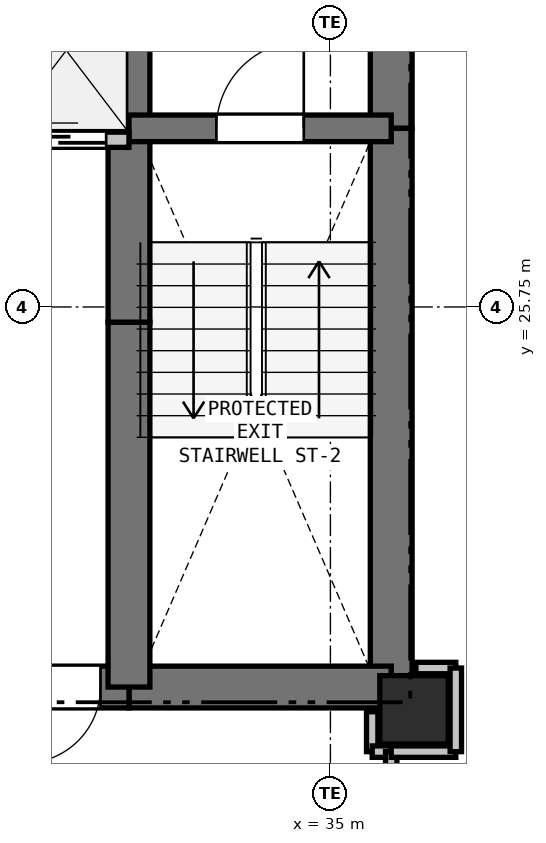
"""IFC4 building model, lengths in metres.
Left out: names, types, materials, properties, quantities, classifications, styles, units other than length and angle.
Written with IfcOpenShell. Run it as: python <this file> out.ifc"""

import sys

from ifc_helpers import new_model, si_unit, direction, frame, frame_2d, origin, origin_2d, place, context, subcontext, project, spatial, rectangle, extrude, element, fill, save


model = new_model("IFC4")
c1 = context("Model", 3, precision=1e-05, world=origin(), true_north=direction((0.0, 1.0)))
c2 = subcontext(c1, "Body", "Model", "MODEL_VIEW")
j1 = project(units=[si_unit("LENGTHUNIT", "METRE"), si_unit("PLANEANGLEUNIT", "RADIAN")], contexts=[c1])
p1 = place(None, origin())
s1 = spatial("IfcSite", under=j1, at=p1, CompositionType="ELEMENT")
p2 = place(p1, origin())
s2 = spatial("IfcBuilding", under=s1, at=p2, CompositionType="ELEMENT")
p3 = place(p2, frame((0.0, 0.0, 29.1)))
s3 = spatial("IfcBuildingStorey", under=s2, at=p3, CompositionType="ELEMENT", Elevation=29.1)
p4 = place(p3, frame((36.1, 20.45, 0.0), z_axis=(0.0, 0.0, 1.0), x_axis=(1.0, 0.0, 0.0)))
e1 = element("IfcColumn", 1, at=p4, inside=s3, PredefinedType="COLUMN", context=c2, shape_type="SweptSolid", body=[
    extrude(rectangle(XDim=0.9, YDim=0.9, at=origin_2d()), origin(), (0.0, 0.0, 1.0), 3.3),
])
p5 = place(p3, frame((35.8, 32.75, 0.0), z_axis=(0.0, 0.0, 1.0), x_axis=(0.0, -1.0, 0.0)))
e2 = element("IfcWall", 2, at=p5, inside=s3, PredefinedType="SHEAR", context=c2, shape_type="SweptSolid", body=[
    extrude(rectangle(XDim=4.65, YDim=0.55, at=frame_2d((2.325, 0.0))), origin(), (0.0, 0.0, 1.0), 3.04),
])
p6 = place(p3, frame((35.8, 28.1, 0.0), z_axis=(0.0, 0.0, 1.0), x_axis=(0.0, -1.0, 0.0)))
e3 = element("IfcWall", 3, at=p6, inside=s3, PredefinedType="SHEAR", context=c2, shape_type="SweptSolid", body=[
    extrude(rectangle(XDim=7.35, YDim=0.55, at=frame_2d((3.675, 0.0))), origin(), (0.0, 0.0, 1.0), 3.04),
])
p7 = place(p3, frame((35.8, 20.75, 0.0), z_axis=(0.0, 0.0, 1.0), x_axis=(-1.0, 0.0, 0.0)))
e4 = element("IfcWall", 4, at=p7, inside=s3, PredefinedType="SHEAR", context=c2, shape_type="SweptSolid", body=[
    extrude(rectangle(XDim=3.45, YDim=0.55, at=frame_2d((1.725, 0.0))), origin(), (0.0, 0.0, 1.0), 3.04),
])
p8 = place(p3, frame((32.35, 20.75, 0.0), z_axis=(0.0, 0.0, 1.0), x_axis=(-1.0, 0.0, 0.0)))
e5 = element("IfcWall", 5, at=p8, inside=s3, PredefinedType="SHEAR", context=c2, shape_type="SweptSolid", body=[
    extrude(rectangle(XDim=1.75, YDim=0.55, at=frame_2d((0.875, 0.0))), origin(), (0.0, 0.0, 1.0), 3.04),
])
p9 = place(p8, frame((0.375, 0.0, 0.0)))
e6 = element("IfcOpeningElement", 6, at=p9, cuts=e5, PredefinedType="OPENING", context=c2, shape_type="SweptSolid", body=[
    extrude(rectangle(XDim=1.0, YDim=2.15, at=frame_2d((0.5, 1.075))), frame((0.0, 0.285, 0.0), z_axis=(0.0, -1.0, 0.0), x_axis=(1.0, 0.0, 0.0)), (0.0, 0.0, 1.0), 0.57),
])
p10 = place(p3, frame((32.35, 20.75, 0.0), z_axis=(0.0, 0.0, 1.0), x_axis=(0.0, 1.0, 0.0)))
e7 = element("IfcWall", 7, at=p10, inside=s3, PredefinedType="SHEAR", context=c2, shape_type="SweptSolid", body=[
    extrude(rectangle(XDim=4.8, YDim=0.55, at=frame_2d((2.4, 0.0))), origin(), (0.0, 0.0, 1.0), 3.04),
])
p11 = place(p3, frame((32.35, 25.55, 0.0), z_axis=(0.0, 0.0, 1.0), x_axis=(0.0, 1.0, 0.0)))
e8 = element("IfcWall", 8, at=p11, inside=s3, PredefinedType="SHEAR", context=c2, shape_type="SweptSolid", body=[
    extrude(rectangle(XDim=2.4, YDim=0.55, at=frame_2d((1.2, 0.0))), origin(), (0.0, 0.0, 1.0), 3.04),
])
p12 = place(p3, frame((32.35, 27.95, 0.0), z_axis=(0.0, 0.0, 1.0), x_axis=(0.0, 1.0, 0.0)))
e9 = element("IfcWall", 9, at=p12, inside=s3, PredefinedType="SHEAR", context=c2, shape_type="SweptSolid", body=[
    extrude(rectangle(XDim=2.8, YDim=0.55, at=frame_2d((1.4, 0.0))), origin(), (0.0, 0.0, 1.0), 3.04),
])
p13 = place(p3, frame((32.35, 28.1, 0.0), z_axis=(0.0, 0.0, 1.0), x_axis=(1.0, 0.0, 0.0)))
e10 = element("IfcWall", 10, at=p13, inside=s3, PredefinedType="SHEAR", context=c2, shape_type="SweptSolid", body=[
    extrude(rectangle(XDim=3.45, YDim=0.35, at=frame_2d((1.725, 0.0))), origin(), (0.0, 0.0, 1.0), 3.04),
])
p14 = place(p13, frame((1.15, 0.0, 0.0)))
e11 = element("IfcOpeningElement", 11, at=p14, cuts=e10, PredefinedType="OPENING", context=c2, shape_type="SweptSolid", body=[
    extrude(rectangle(XDim=1.15, YDim=2.15, at=frame_2d((0.575, 1.075))), frame((0.0, 0.185, 0.0), z_axis=(0.0, -1.0, 0.0), x_axis=(1.0, 0.0, 0.0)), (0.0, 0.0, 1.0), 0.37),
])
p15 = place(p3, frame((27.4, 27.95, 0.0), z_axis=(0.0, 0.0, 1.0), x_axis=(1.0, 0.0, 0.0)))
e12 = element("IfcWall", 12, at=p15, inside=s3, PredefinedType="PARTITIONING", context=c2, shape_type="SweptSolid", body=[
    extrude(rectangle(XDim=4.95, YDim=0.2, at=frame_2d((2.475, 0.0))), origin(), (0.0, 0.0, 1.0), 3.04),
])
p16 = place(p15, frame((0.25, 0.0, 0.0)))
e13 = element("IfcOpeningElement", 13, at=p16, cuts=e12, PredefinedType="OPENING", context=c2, shape_type="SweptSolid", body=[
    extrude(rectangle(XDim=1.1, YDim=2.15, at=frame_2d((0.55, 1.075))), frame((0.0, 0.11, 0.0), z_axis=(0.0, -1.0, 0.0), x_axis=(1.0, 0.0, 0.0)), (0.0, 0.0, 1.0), 0.22),
])
p17 = place(p15, frame((1.9, 0.0, 0.0)))
e14 = element("IfcOpeningElement", 14, at=p17, cuts=e12, PredefinedType="OPENING", context=c2, shape_type="SweptSolid", body=[
    extrude(rectangle(XDim=1.1, YDim=2.15, at=frame_2d((0.55, 1.075))), frame((0.0, 0.11, 0.0), z_axis=(0.0, -1.0, 0.0), x_axis=(1.0, 0.0, 0.0)), (0.0, 0.0, 1.0), 0.22),
])
p18 = place(p15, frame((3.55, 0.0, 0.0)))
e15 = element("IfcOpeningElement", 15, at=p18, cuts=e12, PredefinedType="OPENING", context=c2, shape_type="SweptSolid", body=[
    extrude(rectangle(XDim=1.1, YDim=2.15, at=frame_2d((0.55, 1.075))), frame((0.0, 0.11, 0.0), z_axis=(0.0, -1.0, 0.0), x_axis=(1.0, 0.0, 0.0)), (0.0, 0.0, 1.0), 0.22),
])
p19 = place(p3, frame((35.55, 20.425, 0.0), z_axis=(0.0, 0.0, 1.0), x_axis=(0.0, -1.0, 0.0)))
e16 = element("IfcWall", 16, at=p19, inside=s3, PredefinedType="PARTITIONING", context=c2, shape_type="SweptSolid", body=[
    extrude(rectangle(XDim=0.525, YDim=0.15, at=frame_2d((0.263, 0.0))), origin(), (0.0, 0.0, 1.0), 2.488),
])
p20 = place(p3, frame((35.55, 19.9, 0.0), z_axis=(0.0, 0.0, 1.0), x_axis=(1.0, 0.0, 0.0)))
e17 = element("IfcWall", 17, at=p20, inside=s3, PredefinedType="PARTITIONING", context=c2, shape_type="SweptSolid", body=[
    extrude(rectangle(XDim=0.25, YDim=0.15, at=frame_2d((0.125, 0.0))), origin(), (0.0, 0.0, 1.0), 3.04),
])
p21 = place(p3, frame((35.8, 19.9, 0.0), z_axis=(0.0, 0.0, 1.0), x_axis=(0.0, -1.0, 0.0)))
e18 = element("IfcWall", 18, at=p21, inside=s3, PredefinedType="PARTITIONING", context=c2, shape_type="SweptSolid", body=[
    extrude(rectangle(XDim=1.75, YDim=0.15, at=frame_2d((0.875, 0.0))), origin(), (0.0, 0.0, 1.0), 3.04),
])
p22 = place(p21, frame((0.375, 0.0, 0.0)))
e19 = element("IfcOpeningElement", 19, at=p22, cuts=e18, PredefinedType="OPENING", context=c2, shape_type="SweptSolid", body=[
    extrude(rectangle(XDim=1.0, YDim=2.15, at=frame_2d((0.5, 1.075))), frame((0.0, 0.085, 0.0), z_axis=(0.0, -1.0, 0.0), x_axis=(1.0, 0.0, 0.0)), (0.0, 0.0, 1.0), 0.17),
])
p23 = place(p3, frame((36.65, 21.0, 0.0), z_axis=(0.0, 0.0, 1.0), x_axis=(-1.0, 0.0, 0.0)))
e20 = element("IfcWall", 20, at=p23, inside=s3, PredefinedType="PARTITIONING", context=c2, shape_type="SweptSolid", body=[
    extrude(rectangle(XDim=0.525, YDim=0.15, at=frame_2d((0.262, 0.0))), origin(), (0.0, 0.0, 1.0), 2.488),
])
p24 = place(p3, frame((35.8, 19.9, 0.0), z_axis=(0.0, 0.0, 1.0), x_axis=(1.0, 0.0, 0.0)))
e21 = element("IfcWall", 21, at=p24, inside=s3, PredefinedType="PARTITIONING", context=c2, shape_type="SweptSolid", body=[
    extrude(rectangle(XDim=0.85, YDim=0.15, at=frame_2d((0.425, 0.0))), origin(), (0.0, 0.0, 1.0), 2.337),
])
p25 = place(p3, frame((36.65, 19.9, 0.0), z_axis=(0.0, 0.0, 1.0), x_axis=(0.0, 1.0, 0.0)))
e22 = element("IfcWall", 22, at=p25, inside=s3, PredefinedType="PARTITIONING", context=c2, shape_type="SweptSolid", body=[
    extrude(rectangle(XDim=1.1, YDim=0.15, at=frame_2d((0.55, 0.0))), origin(), (0.0, 0.0, 1.0), 3.04),
])
p26 = place(p18, origin())
e23 = element("IfcDoor", 23, at=p26, inside=s3, OperationType="SLIDING_TO_LEFT", PredefinedType="DOOR", context=c2, shape_type="SweptSolid", body=[
    extrude(rectangle(XDim=1.1, YDim=2.15, at=frame_2d((0.55, 1.075))), frame((0.0, 0.025, 0.0), z_axis=(0.0, -1.0, 0.0), x_axis=(1.0, 0.0, 0.0)), (0.0, 0.0, 1.0), 0.05),
])
fill(e15, e23)
p27 = place(p9, origin())
e24 = element("IfcDoor", 24, at=p27, inside=s3, OperationType="SINGLE_SWING_RIGHT", PredefinedType="DOOR", context=c2, shape_type="SweptSolid", body=[
    extrude(rectangle(XDim=1.0, YDim=2.15, at=frame_2d((0.5, 1.075))), frame((0.0, 0.025, 0.0), z_axis=(0.0, -1.0, 0.0), x_axis=(1.0, 0.0, 0.0)), (0.0, 0.0, 1.0), 0.05),
])
fill(e6, e24)
p28 = place(p14, origin())
e25 = element("IfcDoor", 25, at=p28, inside=s3, OperationType="SINGLE_SWING_RIGHT", PredefinedType="DOOR", context=c2, shape_type="SweptSolid", body=[
    extrude(rectangle(XDim=1.15, YDim=2.15, at=frame_2d((0.575, 1.075))), frame((0.0, 0.025, 0.0), z_axis=(0.0, -1.0, 0.0), x_axis=(1.0, 0.0, 0.0)), (0.0, 0.0, 1.0), 0.05),
])
fill(e11, e25)
save(model, sys.argv[1])
